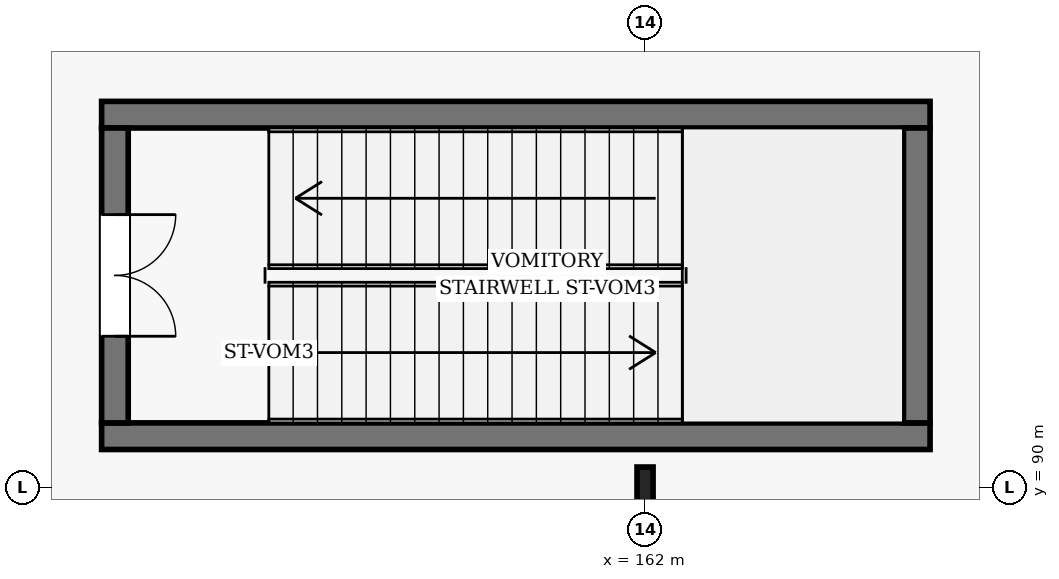
"""IFC4 building model, lengths in metres.
Left out: names, types, materials, properties, quantities, classifications, styles, units other than length and angle.
Written with IfcOpenShell. Run it as: python <this file> out.ifc"""

import sys

from ifc_helpers import new_model, si_unit, direction, frame, frame_2d, origin, origin_2d, place, context, subcontext, project, spatial, rectangle, i_section, extrude, element, fill, save


model = new_model("IFC4")
c1 = context("Model", 3, precision=1e-05, world=origin(), true_north=direction((0.0, 1.0)))
c2 = subcontext(c1, "Body", "Model", "MODEL_VIEW")
j1 = project(units=[si_unit("LENGTHUNIT", "METRE"), si_unit("PLANEANGLEUNIT", "RADIAN")], contexts=[c1])
p1 = place(None, origin())
s1 = spatial("IfcSite", under=j1, at=p1, CompositionType="ELEMENT")
p2 = place(p1, origin())
s2 = spatial("IfcBuilding", under=s1, at=p2, CompositionType="ELEMENT")
p3 = place(p2, origin())
s3 = spatial("IfcBuildingStorey", under=s2, at=p3, CompositionType="ELEMENT", Elevation=0.0)
p4 = place(p3, frame((162.0, 90.0, 0.0), z_axis=(0.0, 0.0, 1.0), x_axis=(1.0, 0.0, 0.0)))
e1 = element("IfcColumn", 1, at=p4, inside=s3, PredefinedType="COLUMN", context=c2, shape_type="SweptSolid", body=[
    extrude(i_section(OverallWidth=0.211, OverallDepth=0.539, WebThickness=0.012, FlangeThickness=0.019, FilletRadius=0.014, at=origin_2d()), origin(), (0.0, 0.0, 1.0), 5.4),
])
for number, where, z_axis, x_axis in (
    (2, (154.85, 90.675, 0.0), (0.0, 0.0, 1.0), (1.0, 0.0, 0.0)),
    (3, (165.75, 94.905, 0.0), (0.0, 0.0, 1.0), (-1.0, 0.0, 0.0)),
):
    element("IfcWall", number, at=place(p3, frame(where, z_axis=z_axis, x_axis=x_axis)), inside=s3, PredefinedType="SHEAR", context=c2, shape_type="SweptSolid", body=[
        extrude(rectangle(XDim=10.9, YDim=0.35, at=frame_2d((5.45, 0.0))), origin(), (0.0, 0.0, 1.0), 5.16),
    ])
p5 = place(p3, frame((155.025, 94.73, 0.0), z_axis=(0.0, 0.0, 1.0), x_axis=(0.0, -1.0, 0.0)))
e4 = element("IfcWall", 4, at=p5, inside=s3, PredefinedType="SHEAR", context=c2, shape_type="SweptSolid", body=[
    extrude(rectangle(XDim=3.88, YDim=0.35, at=frame_2d((1.94, 0.0))), origin(), (0.0, 0.0, 1.0), 5.16),
])
p6 = place(p5, frame((1.14, 0.0, 0.0)))
e5 = element("IfcOpeningElement", 5, at=p6, cuts=e4, PredefinedType="OPENING", context=c2, shape_type="SweptSolid", body=[
    extrude(rectangle(XDim=1.6, YDim=2.2, at=frame_2d((0.8, 1.1))), frame((0.0, 0.185, 0.0), z_axis=(0.0, -1.0, 0.0), x_axis=(1.0, 0.0, 0.0)), (0.0, 0.0, 1.0), 0.37),
])
p7 = place(p3, frame((165.575, 90.85, 0.0), z_axis=(0.0, 0.0, 1.0), x_axis=(0.0, 1.0, 0.0)))
e6 = element("IfcWall", 6, at=p7, inside=s3, PredefinedType="SHEAR", context=c2, shape_type="SweptSolid", body=[
    extrude(rectangle(XDim=3.88, YDim=0.35, at=frame_2d((1.94, 0.0))), origin(), (0.0, 0.0, 1.0), 5.16),
])
p8 = place(p6, origin())
e7 = element("IfcDoor", 7, at=p8, inside=s3, OperationType="DOUBLE_DOOR_SINGLE_SWING", PredefinedType="DOOR", context=c2, shape_type="SweptSolid", body=[
    extrude(rectangle(XDim=1.6, YDim=2.2, at=frame_2d((0.8, 1.1))), frame((0.0, 0.025, 0.0), z_axis=(0.0, -1.0, 0.0), x_axis=(1.0, 0.0, 0.0)), (0.0, 0.0, 1.0), 0.05),
])
fill(e5, e7)
save(model, sys.argv[1])
